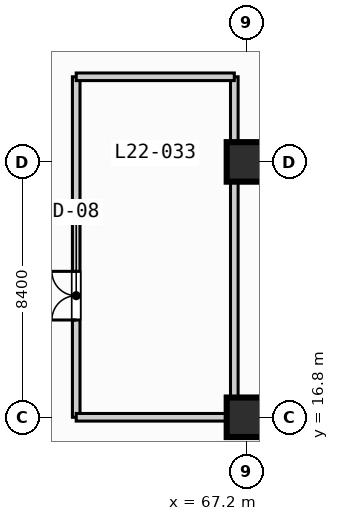
"""IFC4 building model, lengths in metres.
Left out: names, types, materials, properties, quantities, classifications, styles, units other than length and angle.
Written with IfcOpenShell. Run it as: python <this file> out.ifc"""

import sys

from ifc_helpers import new_model, si_unit, direction, frame, frame_2d, origin, origin_2d, place, context, subcontext, project, spatial, rectangle, extrude, element, fill, save


model = new_model("IFC4")
c1 = context("Model", 3, precision=1e-05, world=origin(), true_north=direction((0.0, 1.0)))
c2 = subcontext(c1, "Body", "Model", "MODEL_VIEW")
j1 = project(units=[si_unit("LENGTHUNIT", "METRE"), si_unit("PLANEANGLEUNIT", "RADIAN")], contexts=[c1])
p1 = place(None, origin())
s1 = spatial("IfcSite", under=j1, at=p1, CompositionType="ELEMENT")
p2 = place(p1, origin())
s2 = spatial("IfcBuilding", under=s1, at=p2, CompositionType="ELEMENT")
p3 = place(p2, frame((0.0, 0.0, 94.0)))
s3 = spatial("IfcBuildingStorey", under=s2, at=p3, CompositionType="ELEMENT", Elevation=94.0)
for number, where, z_axis, x_axis in (
    (1, (67.2, 16.8, 0.0), (0.0, 0.0, 1.0), (1.0, 0.0, 0.0)),
    (2, (67.2, 25.2, 0.0), (0.0, 0.0, 1.0), (1.0, 0.0, 0.0)),
):
    element("IfcColumn", number, at=place(p3, frame(where, z_axis=z_axis, x_axis=x_axis)), inside=s3, PredefinedType="COLUMN", context=c2, shape_type="SweptSolid", body=[
        extrude(rectangle(XDim=1.3, YDim=1.3, at=origin_2d()), origin(), (0.0, 0.0, 1.0), 6.0),
    ])
p4 = place(p3, frame((61.6, 16.8, 0.0), z_axis=(0.0, 0.0, 1.0), x_axis=(0.0, 1.0, 0.0)))
e3 = element("IfcWall", 3, at=p4, inside=s3, PredefinedType="SOLIDWALL", context=c2, shape_type="SweptSolid", body=[
    extrude(rectangle(XDim=11.2, YDim=0.25, at=frame_2d((5.6, 0.0))), origin(), (0.0, 0.0, 1.0), 5.75),
])
p5 = place(p4, frame((3.2, 0.0, 0.0)))
e4 = element("IfcOpeningElement", 4, at=p5, cuts=e3, PredefinedType="OPENING", context=c2, shape_type="SweptSolid", body=[
    extrude(rectangle(XDim=1.6, YDim=2.2, at=frame_2d((0.8, 1.1))), frame((0.0, 0.135, 0.0), z_axis=(0.0, -1.0, 0.0), x_axis=(1.0, 0.0, 0.0)), (0.0, 0.0, 1.0), 0.27),
])
p6 = place(p3, frame((66.8, 16.8, 0.0), z_axis=(0.0, 0.0, 1.0), x_axis=(0.0, 1.0, 0.0)))
e5 = element("IfcWall", 5, at=p6, inside=s3, PredefinedType="SOLIDWALL", context=c2, shape_type="SweptSolid", body=[
    extrude(rectangle(XDim=11.2, YDim=0.25, at=frame_2d((5.6, 0.0))), origin(), (0.0, 0.0, 1.0), 5.0),
])
p7 = place(p3, frame((61.6, 16.8, 0.0), z_axis=(0.0, 0.0, 1.0), x_axis=(1.0, 0.0, 0.0)))
e6 = element("IfcWall", 6, at=p7, inside=s3, PredefinedType="SOLIDWALL", context=c2, shape_type="SweptSolid", body=[
    extrude(rectangle(XDim=5.2, YDim=0.25, at=frame_2d((2.6, 0.0))), origin(), (0.0, 0.0, 1.0), 5.44),
])
p8 = place(p3, frame((61.6, 28.0, 0.0), z_axis=(0.0, 0.0, 1.0), x_axis=(1.0, 0.0, 0.0)))
e7 = element("IfcWall", 7, at=p8, inside=s3, PredefinedType="SOLIDWALL", context=c2, shape_type="SweptSolid", body=[
    extrude(rectangle(XDim=5.2, YDim=0.25, at=frame_2d((2.6, 0.0))), origin(), (0.0, 0.0, 1.0), 5.75),
])
p9 = place(p5, origin())
e8 = element("IfcDoor", 8, at=p9, inside=s3, OperationType="SINGLE_SWING_LEFT", PredefinedType="DOOR", context=c2, shape_type="SweptSolid", body=[
    extrude(rectangle(XDim=1.6, YDim=2.2, at=frame_2d((0.8, 1.1))), frame((0.0, 0.025, 0.0), z_axis=(0.0, -1.0, 0.0), x_axis=(1.0, 0.0, 0.0)), (0.0, 0.0, 1.0), 0.05),
])
fill(e4, e8)
save(model, sys.argv[1])
